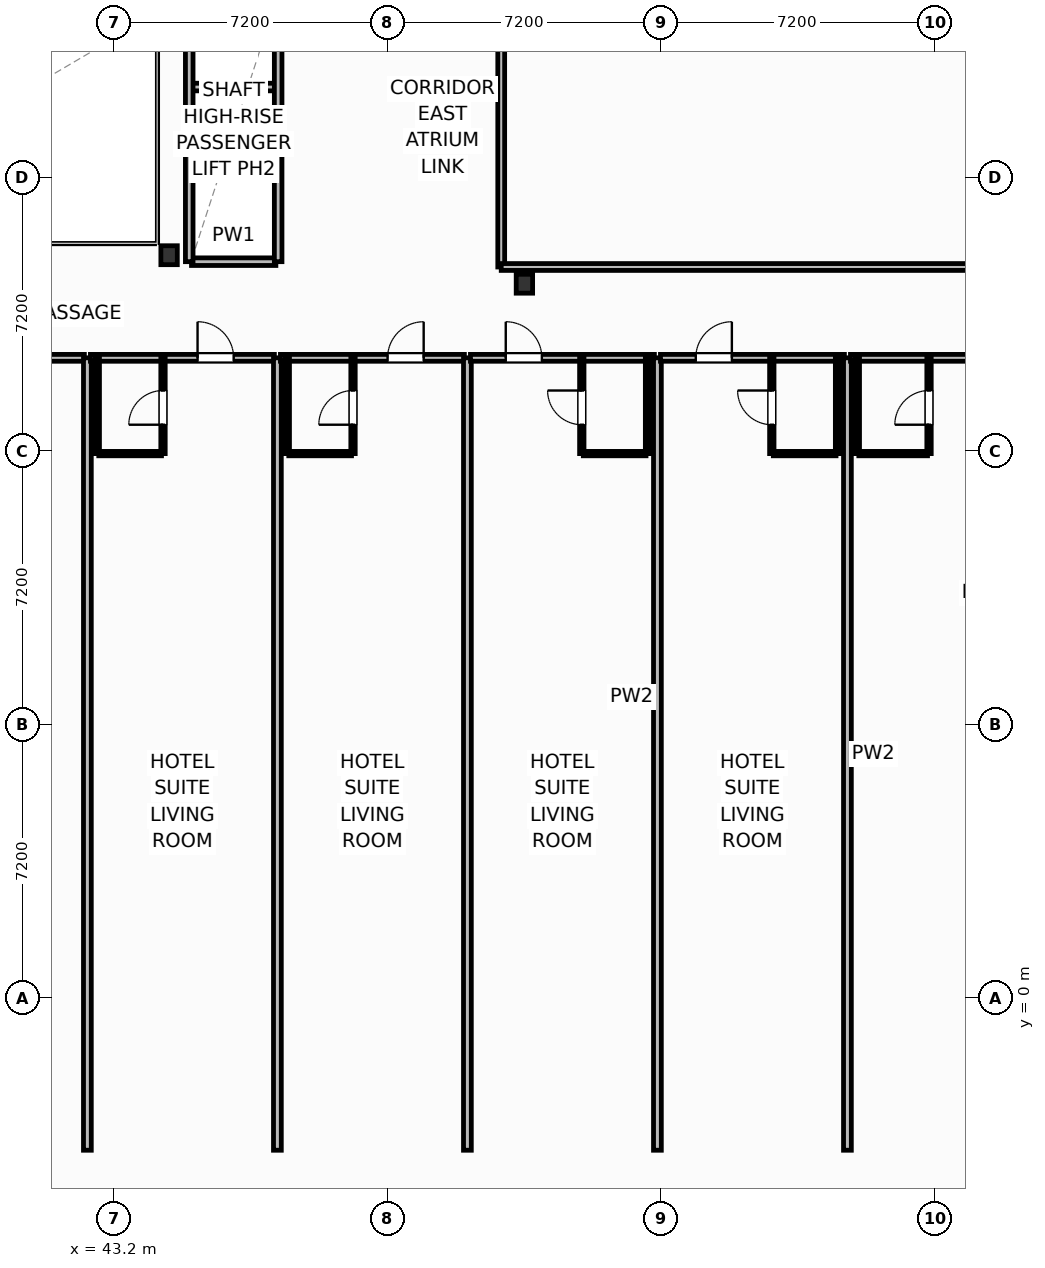
"""IFC4 building model, lengths in metres.
Left out: names, types, materials, properties, quantities, classifications, styles, units other than length and angle.
Written with IfcOpenShell. Run it as: python <this file> out.ifc"""

import sys

from ifc_helpers import new_model, si_unit, direction, frame, frame_2d, origin, origin_2d, place, context, subcontext, project, spatial, rectangle, i_section, extrude, element, fill, save


model = new_model("IFC4")
c1 = context("Model", 3, precision=1e-05, world=origin(), true_north=direction((0.0, 1.0)))
c2 = subcontext(c1, "Body", "Model", "MODEL_VIEW")
j1 = project(units=[si_unit("LENGTHUNIT", "METRE"), si_unit("PLANEANGLEUNIT", "RADIAN")], contexts=[c1])
p1 = place(None, origin())
s1 = spatial("IfcSite", under=j1, at=p1, CompositionType="ELEMENT")
p2 = place(p1, origin())
s2 = spatial("IfcBuilding", under=s1, at=p2, CompositionType="ELEMENT")
p3 = place(p2, frame((0.0, 0.0, 30.7)))
s3 = spatial("IfcBuildingStorey", under=s2, at=p3, CompositionType="ELEMENT", Elevation=30.7)
for number, where, z_axis, x_axis in (
    (1, (44.65, 19.55, 0.0), (0.0, 0.0, 1.0), (1.0, 0.0, 0.0)),
    (2, (54.0, 18.8, 0.0), (0.0, 0.0, 1.0), (1.0, 0.0, 0.0)),
):
    element("IfcColumn", number, at=place(p3, frame(where, z_axis=z_axis, x_axis=x_axis)), inside=s3, PredefinedType="COLUMN", context=c2, shape_type="SweptSolid", body=[
        extrude(i_section(OverallWidth=0.432, OverallDepth=0.498, WebThickness=0.056, FlangeThickness=0.089, FilletRadius=0.025, at=origin_2d()), origin(), (0.0, 0.0, 1.0), 3.7),
    ])
p4 = place(p3, frame((33.518, -1.362, 0.0), z_axis=(0.0, 0.0, 1.0), x_axis=(0.82353935489, -0.567259139148, 0.0)))
e3 = element("IfcWall", 3, at=p4, inside=s3, PredefinedType="SOLIDWALL", context=c2, shape_type="SweptSolid", body=[
    extrude(rectangle(XDim=23.147, YDim=0.22, at=frame_2d((11.573, 0.0))), origin(), (0.0, 0.0, 1.0), 2.73),
])
p5 = place(p4, frame((10.749, 0.0, 0.8)))
e4 = element("IfcOpeningElement", 4, at=p5, cuts=e3, PredefinedType="OPENING", context=c2, shape_type="SweptSolid", body=[
    extrude(rectangle(XDim=1.65, YDim=1.65, at=frame_2d((0.825, 0.825))), frame((0.0, 0.12, 0.0), z_axis=(0.0, -1.0, 0.0), x_axis=(1.0, 0.0, 0.0)), (0.0, 0.0, 1.0), 0.24),
])
p6 = place(p3, frame((37.58, 16.85, 0.0), z_axis=(0.0, 0.0, 1.0), x_axis=(1.0, 0.0, 0.0)))
e5 = element("IfcWall", 5, at=p6, inside=s3, PredefinedType="PARTITIONING", context=c2, shape_type="SweptSolid", body=[
    extrude(rectangle(XDim=4.84, YDim=0.18, at=frame_2d((2.42, 0.0))), origin(), (0.0, 0.0, 1.0), 3.45),
])
p7 = place(p6, frame((2.819, 0.0, 0.0)))
e6 = element("IfcOpeningElement", 6, at=p7, cuts=e5, PredefinedType="OPENING", context=c2, shape_type="SweptSolid", body=[
    extrude(rectangle(XDim=0.95, YDim=2.15, at=frame_2d((0.475, 1.075))), frame((0.0, 0.1, 0.0), z_axis=(0.0, -1.0, 0.0), x_axis=(1.0, 0.0, 0.0)), (0.0, 0.0, 1.0), 0.2),
])
p8 = place(p3, frame((42.5, -4.0, 0.0), z_axis=(0.0, 0.0, 1.0), x_axis=(0.0, 1.0, 0.0)))
e7 = element("IfcWall", 7, at=p8, inside=s3, PredefinedType="PARTITIONING", context=c2, shape_type="SweptSolid", body=[
    extrude(rectangle(XDim=20.85, YDim=0.205, at=frame_2d((10.425, 0.0))), origin(), (0.0, 0.0, 1.0), 2.58),
])
p9 = place(p3, frame((42.58, 16.85, 0.0), z_axis=(0.0, 0.0, 1.0), x_axis=(1.0, 0.0, 0.0)))
e8 = element("IfcWall", 8, at=p9, inside=s3, PredefinedType="PARTITIONING", context=c2, shape_type="SweptSolid", body=[
    extrude(rectangle(XDim=4.84, YDim=0.18, at=frame_2d((2.42, 0.0))), origin(), (0.0, 0.0, 1.0), 3.45),
])
p10 = place(p9, frame((2.819, 0.0, 0.0)))
e9 = element("IfcOpeningElement", 9, at=p10, cuts=e8, PredefinedType="OPENING", context=c2, shape_type="SweptSolid", body=[
    extrude(rectangle(XDim=0.95, YDim=2.15, at=frame_2d((0.475, 1.075))), frame((0.0, 0.1, 0.0), z_axis=(0.0, -1.0, 0.0), x_axis=(1.0, 0.0, 0.0)), (0.0, 0.0, 1.0), 0.2),
])
p11 = place(p3, frame((42.8, 14.33, 0.0), z_axis=(0.0, 0.0, 1.0), x_axis=(1.0, 0.0, 0.0)))
e10 = element("IfcWall", 10, at=p11, inside=s3, PredefinedType="PARTITIONING", context=c2, shape_type="SweptSolid", body=[
    extrude(rectangle(XDim=1.65, YDim=0.115, at=frame_2d((0.825, 0.0))), origin(), (0.0, 0.0, 1.0), 3.45),
])
p12 = place(p3, frame((44.49, 14.33, 0.0), z_axis=(0.0, 0.0, 1.0), x_axis=(0.0, 1.0, 0.0)))
e11 = element("IfcWall", 11, at=p12, inside=s3, PredefinedType="PARTITIONING", context=c2, shape_type="SweptSolid", body=[
    extrude(rectangle(XDim=2.52, YDim=0.115, at=frame_2d((1.26, 0.0))), origin(), (0.0, 0.0, 1.0), 3.45),
])
p13 = place(p12, frame((0.76, 0.0, 0.0)))
e12 = element("IfcOpeningElement", 12, at=p13, cuts=e11, PredefinedType="OPENING", context=c2, shape_type="SweptSolid", body=[
    extrude(rectangle(XDim=0.9, YDim=2.05, at=frame_2d((0.45, 1.025))), frame((0.0, 0.067, 0.0), z_axis=(0.0, -1.0, 0.0), x_axis=(1.0, 0.0, 0.0)), (0.0, 0.0, 1.0), 0.135),
])
p14 = place(p3, frame((42.76, 14.33, 0.0), z_axis=(0.0, 0.0, 1.0), x_axis=(0.0, 1.0, 0.0)))
e13 = element("IfcWall", 13, at=p14, inside=s3, PredefinedType="PARTITIONING", context=c2, shape_type="SweptSolid", body=[
    extrude(rectangle(XDim=2.52, YDim=0.115, at=frame_2d((1.26, 0.0))), origin(), (0.0, 0.0, 1.0), 3.45),
])
p15 = place(p3, frame((47.5, -4.0, 0.0), z_axis=(0.0, 0.0, 1.0), x_axis=(0.0, 1.0, 0.0)))
e14 = element("IfcWall", 14, at=p15, inside=s3, PredefinedType="PARTITIONING", context=c2, shape_type="SweptSolid", body=[
    extrude(rectangle(XDim=20.85, YDim=0.205, at=frame_2d((10.425, 0.0))), origin(), (0.0, 0.0, 1.0), 3.45),
])
p16 = place(p3, frame((47.58, 16.85, 0.0), z_axis=(0.0, 0.0, 1.0), x_axis=(1.0, 0.0, 0.0)))
e15 = element("IfcWall", 15, at=p16, inside=s3, PredefinedType="PARTITIONING", context=c2, shape_type="SweptSolid", body=[
    extrude(rectangle(XDim=4.84, YDim=0.18, at=frame_2d((2.42, 0.0))), origin(), (0.0, 0.0, 1.0), 3.45),
])
p17 = place(p16, frame((2.819, 0.0, 0.0)))
e16 = element("IfcOpeningElement", 16, at=p17, cuts=e15, PredefinedType="OPENING", context=c2, shape_type="SweptSolid", body=[
    extrude(rectangle(XDim=0.95, YDim=2.15, at=frame_2d((0.475, 1.075))), frame((0.0, 0.1, 0.0), z_axis=(0.0, -1.0, 0.0), x_axis=(1.0, 0.0, 0.0)), (0.0, 0.0, 1.0), 0.2),
])
p18 = place(p3, frame((47.8, 14.33, 0.0), z_axis=(0.0, 0.0, 1.0), x_axis=(1.0, 0.0, 0.0)))
e17 = element("IfcWall", 17, at=p18, inside=s3, PredefinedType="PARTITIONING", context=c2, shape_type="SweptSolid", body=[
    extrude(rectangle(XDim=1.65, YDim=0.115, at=frame_2d((0.825, 0.0))), origin(), (0.0, 0.0, 1.0), 3.45),
])
p19 = place(p3, frame((49.49, 14.33, 0.0), z_axis=(0.0, 0.0, 1.0), x_axis=(0.0, 1.0, 0.0)))
e18 = element("IfcWall", 18, at=p19, inside=s3, PredefinedType="PARTITIONING", context=c2, shape_type="SweptSolid", body=[
    extrude(rectangle(XDim=2.52, YDim=0.115, at=frame_2d((1.26, 0.0))), origin(), (0.0, 0.0, 1.0), 3.45),
])
p20 = place(p19, frame((0.76, 0.0, 0.0)))
e19 = element("IfcOpeningElement", 19, at=p20, cuts=e18, PredefinedType="OPENING", context=c2, shape_type="SweptSolid", body=[
    extrude(rectangle(XDim=0.9, YDim=2.05, at=frame_2d((0.45, 1.025))), frame((0.0, 0.067, 0.0), z_axis=(0.0, -1.0, 0.0), x_axis=(1.0, 0.0, 0.0)), (0.0, 0.0, 1.0), 0.135),
])
p21 = place(p3, frame((47.76, 14.33, 0.0), z_axis=(0.0, 0.0, 1.0), x_axis=(0.0, 1.0, 0.0)))
e20 = element("IfcWall", 20, at=p21, inside=s3, PredefinedType="PARTITIONING", context=c2, shape_type="SweptSolid", body=[
    extrude(rectangle(XDim=2.52, YDim=0.115, at=frame_2d((1.26, 0.0))), origin(), (0.0, 0.0, 1.0), 3.45),
])
p22 = place(p3, frame((52.5, -4.0, 0.0), z_axis=(0.0, 0.0, 1.0), x_axis=(0.0, 1.0, 0.0)))
e21 = element("IfcWall", 21, at=p22, inside=s3, PredefinedType="PARTITIONING", context=c2, shape_type="SweptSolid", body=[
    extrude(rectangle(XDim=20.85, YDim=0.205, at=frame_2d((10.425, 0.0))), origin(), (0.0, 0.0, 1.0), 3.45),
])
p23 = place(p3, frame((52.58, 16.85, 0.0), z_axis=(0.0, 0.0, 1.0), x_axis=(1.0, 0.0, 0.0)))
e22 = element("IfcWall", 22, at=p23, inside=s3, PredefinedType="PARTITIONING", context=c2, shape_type="SweptSolid", body=[
    extrude(rectangle(XDim=4.84, YDim=0.18, at=frame_2d((2.42, 0.0))), origin(), (0.0, 0.0, 1.0), 3.45),
])
p24 = place(p23, frame((0.929, 0.0, 0.0)))
e23 = element("IfcOpeningElement", 23, at=p24, cuts=e22, PredefinedType="OPENING", context=c2, shape_type="SweptSolid", body=[
    extrude(rectangle(XDim=0.95, YDim=2.15, at=frame_2d((0.475, 1.075))), frame((0.0, 0.1, 0.0), z_axis=(0.0, -1.0, 0.0), x_axis=(1.0, 0.0, 0.0)), (0.0, 0.0, 1.0), 0.2),
])
p25 = place(p3, frame((55.55, 14.33, 0.0), z_axis=(0.0, 0.0, 1.0), x_axis=(1.0, 0.0, 0.0)))
e24 = element("IfcWall", 24, at=p25, inside=s3, PredefinedType="PARTITIONING", context=c2, shape_type="SweptSolid", body=[
    extrude(rectangle(XDim=1.65, YDim=0.115, at=frame_2d((0.825, 0.0))), origin(), (0.0, 0.0, 1.0), 3.45),
])
p26 = place(p3, frame((55.51, 14.33, 0.0), z_axis=(0.0, 0.0, 1.0), x_axis=(0.0, 1.0, 0.0)))
e25 = element("IfcWall", 25, at=p26, inside=s3, PredefinedType="PARTITIONING", context=c2, shape_type="SweptSolid", body=[
    extrude(rectangle(XDim=2.52, YDim=0.115, at=frame_2d((1.26, 0.0))), origin(), (0.0, 0.0, 1.0), 3.45),
])
p27 = place(p26, frame((0.76, 0.0, 0.0)))
e26 = element("IfcOpeningElement", 26, at=p27, cuts=e25, PredefinedType="OPENING", context=c2, shape_type="SweptSolid", body=[
    extrude(rectangle(XDim=0.9, YDim=2.05, at=frame_2d((0.45, 1.025))), frame((0.0, 0.067, 0.0), z_axis=(0.0, -1.0, 0.0), x_axis=(1.0, 0.0, 0.0)), (0.0, 0.0, 1.0), 0.135),
])
p28 = place(p3, frame((57.24, 14.33, 0.0), z_axis=(0.0, 0.0, 1.0), x_axis=(0.0, 1.0, 0.0)))
e27 = element("IfcWall", 27, at=p28, inside=s3, PredefinedType="PARTITIONING", context=c2, shape_type="SweptSolid", body=[
    extrude(rectangle(XDim=2.52, YDim=0.115, at=frame_2d((1.26, 0.0))), origin(), (0.0, 0.0, 1.0), 3.45),
])
p29 = place(p3, frame((57.5, -4.0, 0.0), z_axis=(0.0, 0.0, 1.0), x_axis=(0.0, 1.0, 0.0)))
e28 = element("IfcWall", 28, at=p29, inside=s3, PredefinedType="PARTITIONING", context=c2, shape_type="SweptSolid", body=[
    extrude(rectangle(XDim=20.85, YDim=0.205, at=frame_2d((10.425, 0.0))), origin(), (0.0, 0.0, 1.0), 3.45),
])
p30 = place(p3, frame((57.58, 16.85, 0.0), z_axis=(0.0, 0.0, 1.0), x_axis=(1.0, 0.0, 0.0)))
e29 = element("IfcWall", 29, at=p30, inside=s3, PredefinedType="PARTITIONING", context=c2, shape_type="SweptSolid", body=[
    extrude(rectangle(XDim=4.84, YDim=0.18, at=frame_2d((2.42, 0.0))), origin(), (0.0, 0.0, 1.0), 2.58),
])
p31 = place(p30, frame((0.929, 0.0, 0.0)))
e30 = element("IfcOpeningElement", 30, at=p31, cuts=e29, PredefinedType="OPENING", context=c2, shape_type="SweptSolid", body=[
    extrude(rectangle(XDim=0.95, YDim=2.15, at=frame_2d((0.475, 1.075))), frame((0.0, 0.1, 0.0), z_axis=(0.0, -1.0, 0.0), x_axis=(1.0, 0.0, 0.0)), (0.0, 0.0, 1.0), 0.2),
])
p32 = place(p3, frame((60.55, 14.33, 0.0), z_axis=(0.0, 0.0, 1.0), x_axis=(1.0, 0.0, 0.0)))
e31 = element("IfcWall", 31, at=p32, inside=s3, PredefinedType="PARTITIONING", context=c2, shape_type="SweptSolid", body=[
    extrude(rectangle(XDim=1.65, YDim=0.115, at=frame_2d((0.825, 0.0))), origin(), (0.0, 0.0, 1.0), 3.45),
])
p33 = place(p3, frame((60.51, 14.33, 0.0), z_axis=(0.0, 0.0, 1.0), x_axis=(0.0, 1.0, 0.0)))
e32 = element("IfcWall", 32, at=p33, inside=s3, PredefinedType="PARTITIONING", context=c2, shape_type="SweptSolid", body=[
    extrude(rectangle(XDim=2.52, YDim=0.115, at=frame_2d((1.26, 0.0))), origin(), (0.0, 0.0, 1.0), 3.45),
])
p34 = place(p33, frame((0.76, 0.0, 0.0)))
e33 = element("IfcOpeningElement", 33, at=p34, cuts=e32, PredefinedType="OPENING", context=c2, shape_type="SweptSolid", body=[
    extrude(rectangle(XDim=0.9, YDim=2.05, at=frame_2d((0.45, 1.025))), frame((0.0, 0.067, 0.0), z_axis=(0.0, -1.0, 0.0), x_axis=(1.0, 0.0, 0.0)), (0.0, 0.0, 1.0), 0.135),
])
p35 = place(p3, frame((62.24, 14.33, 0.0), z_axis=(0.0, 0.0, 1.0), x_axis=(0.0, 1.0, 0.0)))
e34 = element("IfcWall", 34, at=p35, inside=s3, PredefinedType="PARTITIONING", context=c2, shape_type="SweptSolid", body=[
    extrude(rectangle(XDim=2.52, YDim=0.115, at=frame_2d((1.26, 0.0))), origin(), (0.0, 0.0, 1.0), 3.45),
])
p36 = place(p3, frame((62.5, -4.0, 0.0), z_axis=(0.0, 0.0, 1.0), x_axis=(0.0, 1.0, 0.0)))
e35 = element("IfcWall", 35, at=p36, inside=s3, PredefinedType="PARTITIONING", context=c2, shape_type="SweptSolid", body=[
    extrude(rectangle(XDim=20.85, YDim=0.205, at=frame_2d((10.425, 0.0))), origin(), (0.0, 0.0, 1.0), 3.45),
])
p37 = place(p3, frame((62.58, 16.85, 0.0), z_axis=(0.0, 0.0, 1.0), x_axis=(1.0, 0.0, 0.0)))
e36 = element("IfcWall", 36, at=p37, inside=s3, PredefinedType="PARTITIONING", context=c2, shape_type="SweptSolid", body=[
    extrude(rectangle(XDim=14.24, YDim=0.18, at=frame_2d((7.12, 0.0))), origin(), (0.0, 0.0, 1.0), 3.45),
])
p38 = place(p37, frame((3.11, 0.0, 0.0)))
e37 = element("IfcOpeningElement", 37, at=p38, cuts=e36, PredefinedType="OPENING", context=c2, shape_type="SweptSolid", body=[
    extrude(rectangle(XDim=0.95, YDim=2.15, at=frame_2d((0.475, 1.075))), frame((0.0, 0.1, 0.0), z_axis=(0.0, -1.0, 0.0), x_axis=(1.0, 0.0, 0.0)), (0.0, 0.0, 1.0), 0.2),
])
p39 = place(p3, frame((62.8, 14.33, 0.0), z_axis=(0.0, 0.0, 1.0), x_axis=(1.0, 0.0, 0.0)))
e38 = element("IfcWall", 38, at=p39, inside=s3, PredefinedType="PARTITIONING", context=c2, shape_type="SweptSolid", body=[
    extrude(rectangle(XDim=1.807, YDim=0.115, at=frame_2d((0.904, 0.0))), origin(), (0.0, 0.0, 1.0), 3.45),
])
p40 = place(p3, frame((64.647, 14.33, 0.0), z_axis=(0.0, 0.0, 1.0), x_axis=(0.0, 1.0, 0.0)))
e39 = element("IfcWall", 39, at=p40, inside=s3, PredefinedType="PARTITIONING", context=c2, shape_type="SweptSolid", body=[
    extrude(rectangle(XDim=2.52, YDim=0.115, at=frame_2d((1.26, 0.0))), origin(), (0.0, 0.0, 1.0), 3.45),
])
p41 = place(p40, frame((0.76, 0.0, 0.0)))
e40 = element("IfcOpeningElement", 40, at=p41, cuts=e39, PredefinedType="OPENING", context=c2, shape_type="SweptSolid", body=[
    extrude(rectangle(XDim=0.9, YDim=2.05, at=frame_2d((0.45, 1.025))), frame((0.0, 0.067, 0.0), z_axis=(0.0, -1.0, 0.0), x_axis=(1.0, 0.0, 0.0)), (0.0, 0.0, 1.0), 0.135),
])
p42 = place(p3, frame((62.76, 14.33, 0.0), z_axis=(0.0, 0.0, 1.0), x_axis=(0.0, 1.0, 0.0)))
e41 = element("IfcWall", 41, at=p42, inside=s3, PredefinedType="PARTITIONING", context=c2, shape_type="SweptSolid", body=[
    extrude(rectangle(XDim=2.52, YDim=0.115, at=frame_2d((1.26, 0.0))), origin(), (0.0, 0.0, 1.0), 3.45),
])
p43 = place(p3, frame((53.39, 19.24, 0.0), z_axis=(0.0, 0.0, 1.0), x_axis=(0.0, 1.0, 0.0)))
e42 = element("IfcWall", 42, at=p43, inside=s3, PredefinedType="PARTITIONING", context=c2, shape_type="SweptSolid", body=[
    extrude(rectangle(XDim=20.06, YDim=0.18, at=frame_2d((10.03, 0.0))), origin(), (0.0, 0.0, 1.0), 3.45),
])
p44 = place(p43, frame((7.7, 0.0, 0.0)))
e43 = element("IfcOpeningElement", 43, at=p44, cuts=e42, PredefinedType="OPENING", context=c2, shape_type="SweptSolid", body=[
    extrude(rectangle(XDim=0.95, YDim=2.05, at=frame_2d((0.475, 1.025))), frame((0.0, 0.1, 0.0), z_axis=(0.0, -1.0, 0.0), x_axis=(1.0, 0.0, 0.0)), (0.0, 0.0, 1.0), 0.2),
])
p45 = place(p3, frame((53.39, 19.24, 0.0), z_axis=(0.0, 0.0, 1.0), x_axis=(1.0, 0.0, 0.0)))
e44 = element("IfcWall", 44, at=p45, inside=s3, PredefinedType="PARTITIONING", context=c2, shape_type="SweptSolid", body=[
    extrude(rectangle(XDim=23.61, YDim=0.18, at=frame_2d((11.805, 0.0))), origin(), (0.0, 0.0, 1.0), 3.45),
])
for number, where, z_axis, x_axis in (
    (45, (45.24, 21.675, 0.0), (0.0, 0.0, 1.0), (1.0, 0.0, 0.0)),
    (46, (45.24, 23.975, 0.0), (0.0, 0.0, 1.0), (1.0, 0.0, 0.0)),
):
    element("IfcWall", number, at=place(p3, frame(where, z_axis=z_axis, x_axis=x_axis)), inside=s3, PredefinedType="PARTITIONING", context=c2, shape_type="SweptSolid", body=[
        extrude(rectangle(XDim=2.22, YDim=0.2, at=frame_2d((1.11, 0.0))), origin(), (0.0, 0.0, 1.0), 3.45),
    ])
p46 = place(p3, frame((45.24, 19.38, 0.0), z_axis=(0.0, 0.0, 1.0), x_axis=(1.0, 0.0, 0.0)))
e47 = element("IfcWall", 47, at=p46, inside=s3, PredefinedType="PARTITIONING", context=c2, shape_type="SweptSolid", body=[
    extrude(rectangle(XDim=2.22, YDim=0.2, at=frame_2d((1.11, 0.0))), origin(), (0.0, 0.0, 1.0), 2.662),
])
for number, where, z_axis, x_axis in (
    (48, (45.18, 19.38, 0.0), (0.0, 0.0, 1.0), (0.0, 1.0, 0.0)),
    (49, (47.52, 19.38, 0.0), (0.0, 0.0, 1.0), (0.0, 1.0, 0.0)),
):
    element("IfcWall", number, at=place(p3, frame(where, z_axis=z_axis, x_axis=x_axis)), inside=s3, PredefinedType="PARTITIONING", context=c2, shape_type="SweptSolid", body=[
        extrude(rectangle(XDim=6.9, YDim=0.2, at=frame_2d((3.45, 0.0))), origin(), (0.0, 0.0, 1.0), 3.45),
    ])
p47 = place(p10, origin())
e50 = element("IfcDoor", 50, at=p47, inside=s3, OperationType="SINGLE_SWING_LEFT", PredefinedType="DOOR", context=c2, shape_type="SweptSolid", body=[
    extrude(rectangle(XDim=0.95, YDim=2.15, at=frame_2d((0.475, 1.075))), frame((0.0, 0.025, 0.0), z_axis=(0.0, -1.0, 0.0), x_axis=(1.0, 0.0, 0.0)), (0.0, 0.0, 1.0), 0.05),
])
fill(e9, e50)
p48 = place(p13, origin())
e51 = element("IfcDoor", 51, at=p48, inside=s3, OperationType="SINGLE_SWING_LEFT", PredefinedType="DOOR", context=c2, shape_type="SweptSolid", body=[
    extrude(rectangle(XDim=0.9, YDim=2.05, at=frame_2d((0.45, 1.025))), frame((0.0, 0.025, 0.0), z_axis=(0.0, -1.0, 0.0), x_axis=(1.0, 0.0, 0.0)), (0.0, 0.0, 1.0), 0.05),
])
fill(e12, e51)
p49 = place(p17, origin())
e52 = element("IfcDoor", 52, at=p49, inside=s3, OperationType="SINGLE_SWING_RIGHT", PredefinedType="DOOR", context=c2, shape_type="SweptSolid", body=[
    extrude(rectangle(XDim=0.95, YDim=2.15, at=frame_2d((0.475, 1.075))), frame((0.0, 0.025, 0.0), z_axis=(0.0, -1.0, 0.0), x_axis=(1.0, 0.0, 0.0)), (0.0, 0.0, 1.0), 0.05),
])
fill(e16, e52)
p50 = place(p20, origin())
e53 = element("IfcDoor", 53, at=p50, inside=s3, OperationType="SINGLE_SWING_LEFT", PredefinedType="DOOR", context=c2, shape_type="SweptSolid", body=[
    extrude(rectangle(XDim=0.9, YDim=2.05, at=frame_2d((0.45, 1.025))), frame((0.0, 0.025, 0.0), z_axis=(0.0, -1.0, 0.0), x_axis=(1.0, 0.0, 0.0)), (0.0, 0.0, 1.0), 0.05),
])
fill(e19, e53)
p51 = place(p24, origin())
e54 = element("IfcDoor", 54, at=p51, inside=s3, OperationType="SINGLE_SWING_LEFT", PredefinedType="DOOR", context=c2, shape_type="SweptSolid", body=[
    extrude(rectangle(XDim=0.95, YDim=2.15, at=frame_2d((0.475, 1.075))), frame((0.0, 0.025, 0.0), z_axis=(0.0, -1.0, 0.0), x_axis=(1.0, 0.0, 0.0)), (0.0, 0.0, 1.0), 0.05),
])
fill(e23, e54)
p52 = place(p27, origin())
e55 = element("IfcDoor", 55, at=p52, inside=s3, OperationType="SINGLE_SWING_RIGHT", PredefinedType="DOOR", context=c2, shape_type="SweptSolid", body=[
    extrude(rectangle(XDim=0.9, YDim=2.05, at=frame_2d((0.45, 1.025))), frame((0.0, 0.025, 0.0), z_axis=(0.0, -1.0, 0.0), x_axis=(1.0, 0.0, 0.0)), (0.0, 0.0, 1.0), 0.05),
])
fill(e26, e55)
p53 = place(p31, origin())
e56 = element("IfcDoor", 56, at=p53, inside=s3, OperationType="SINGLE_SWING_RIGHT", PredefinedType="DOOR", context=c2, shape_type="SweptSolid", body=[
    extrude(rectangle(XDim=0.95, YDim=2.15, at=frame_2d((0.475, 1.075))), frame((0.0, 0.025, 0.0), z_axis=(0.0, -1.0, 0.0), x_axis=(1.0, 0.0, 0.0)), (0.0, 0.0, 1.0), 0.05),
])
fill(e30, e56)
p54 = place(p34, origin())
e57 = element("IfcDoor", 57, at=p54, inside=s3, OperationType="SINGLE_SWING_RIGHT", PredefinedType="DOOR", context=c2, shape_type="SweptSolid", body=[
    extrude(rectangle(XDim=0.9, YDim=2.05, at=frame_2d((0.45, 1.025))), frame((0.0, 0.025, 0.0), z_axis=(0.0, -1.0, 0.0), x_axis=(1.0, 0.0, 0.0)), (0.0, 0.0, 1.0), 0.05),
])
fill(e33, e57)
p55 = place(p41, origin())
e58 = element("IfcDoor", 58, at=p55, inside=s3, OperationType="SINGLE_SWING_LEFT", PredefinedType="DOOR", context=c2, shape_type="SweptSolid", body=[
    extrude(rectangle(XDim=0.9, YDim=2.05, at=frame_2d((0.45, 1.025))), frame((0.0, 0.025, 0.0), z_axis=(0.0, -1.0, 0.0), x_axis=(1.0, 0.0, 0.0)), (0.0, 0.0, 1.0), 0.05),
])
fill(e40, e58)
save(model, sys.argv[1])
